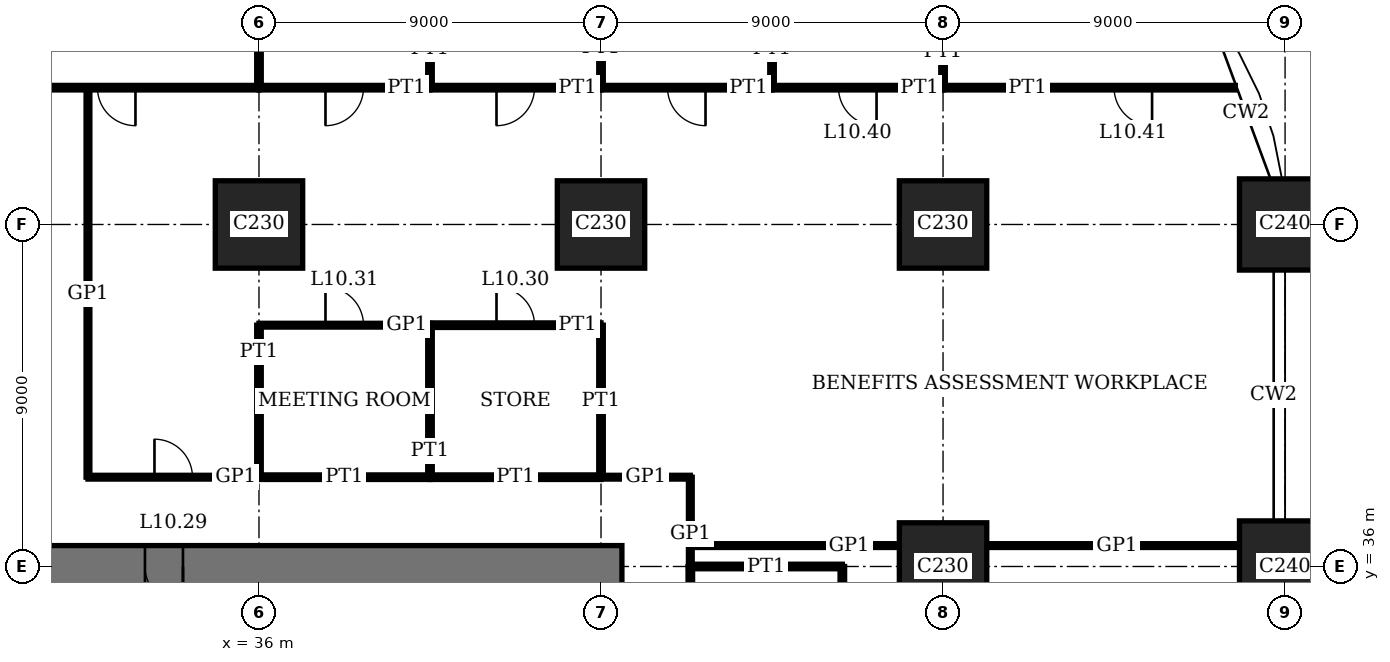
"""IFC4 building model, lengths in metres.
Left out: names, types, materials, properties, quantities, classifications, styles, units other than length and angle.
Written with IfcOpenShell. Run it as: python <this file> out.ifc"""

import sys

from ifc_helpers import new_model, si_unit, direction, frame, frame_2d, origin, origin_2d, place, context, subcontext, project, spatial, rectangle, extrude, element, fill, save


model = new_model("IFC4")
c1 = context("Model", 3, precision=1e-05, world=origin(), true_north=direction((0.0, 1.0)))
c2 = subcontext(c1, "Body", "Model", "MODEL_VIEW")
j1 = project(units=[si_unit("LENGTHUNIT", "METRE"), si_unit("PLANEANGLEUNIT", "RADIAN")], contexts=[c1])
p1 = place(None, origin())
s1 = spatial("IfcSite", under=j1, at=p1, CompositionType="ELEMENT")
p2 = place(p1, origin())
s2 = spatial("IfcBuilding", under=s1, at=p2, CompositionType="ELEMENT")
p3 = place(p2, frame((0.0, 0.0, 43.8)))
s3 = spatial("IfcBuildingStorey", under=s2, at=p3, CompositionType="ELEMENT", Elevation=43.8)
for number, where, z_axis, x_axis in (
    (1, (36.0, 45.0, 0.0), (0.0, 0.0, 1.0), (1.0, 0.0, 0.0)),
    (2, (45.0, 45.0, 0.0), (0.0, 0.0, 1.0), (1.0, 0.0, 0.0)),
    (3, (54.0, 36.0, 0.0), (0.0, 0.0, 1.0), (1.0, 0.0, 0.0)),
    (4, (54.0, 45.0, 0.0), (0.0, 0.0, 1.0), (1.0, 0.0, 0.0)),
):
    element("IfcColumn", number, at=place(p3, frame(where, z_axis=z_axis, x_axis=x_axis)), inside=s3, PredefinedType="COLUMN", context=c2, shape_type="SweptSolid", body=[
        extrude(rectangle(XDim=2.3, YDim=2.3, at=origin_2d()), origin(), (0.0, 0.0, 1.0), 4.0),
    ])
for number, where, z_axis, x_axis in (
    (5, (63.0, 36.0, 0.0), (0.0, 0.0, 1.0), (1.0, 0.0, 0.0)),
    (6, (63.0, 45.0, 0.0), (0.0, 0.0, 1.0), (1.0, 0.0, 0.0)),
):
    element("IfcColumn", number, at=place(p3, frame(where, z_axis=z_axis, x_axis=x_axis)), inside=s3, PredefinedType="COLUMN", context=c2, shape_type="SweptSolid", body=[
        extrude(rectangle(XDim=2.4, YDim=2.4, at=origin_2d()), origin(), (0.0, 0.0, 1.0), 4.0),
    ])
p4 = place(p3, frame((45.55, 36.0, 0.0), z_axis=(0.0, 0.0, 1.0), x_axis=(-1.0, 0.0, 0.0)))
e7 = element("IfcWall", 7, at=p4, inside=s3, PredefinedType="SHEAR", context=c2, shape_type="SweptSolid", body=[
    extrude(rectangle(XDim=28.1, YDim=1.1, at=frame_2d((14.05, 0.0))), origin(), (0.0, 0.0, 1.0), 4.0),
])
p5 = place(p4, frame((11.55, 0.0, 0.0)))
e8 = element("IfcOpeningElement", 8, at=p5, cuts=e7, PredefinedType="OPENING", context=c2, shape_type="SweptSolid", body=[
    extrude(rectangle(XDim=1.0, YDim=2.4, at=frame_2d((0.5, 1.2))), frame((0.0, 0.56, 0.0), z_axis=(0.0, -1.0, 0.0), x_axis=(1.0, 0.0, 0.0)), (0.0, 0.0, 1.0), 1.12),
])
p6 = place(p4, frame((16.55, 0.0, 0.0)))
e9 = element("IfcOpeningElement", 9, at=p6, cuts=e7, PredefinedType="OPENING", context=c2, shape_type="SweptSolid", body=[
    extrude(rectangle(XDim=1.0, YDim=2.4, at=frame_2d((0.5, 1.2))), frame((0.0, 0.56, 0.0), z_axis=(0.0, -1.0, 0.0), x_axis=(1.0, 0.0, 0.0)), (0.0, 0.0, 1.0), 1.12),
])
p7 = place(p4, frame((20.0, 0.0, 0.0)))
e10 = element("IfcOpeningElement", 10, at=p7, cuts=e7, PredefinedType="OPENING", context=c2, shape_type="SweptSolid", body=[
    extrude(rectangle(XDim=1.1, YDim=2.4, at=frame_2d((0.55, 1.2))), frame((0.0, 0.56, 0.0), z_axis=(0.0, -1.0, 0.0), x_axis=(1.0, 0.0, 0.0)), (0.0, 0.0, 1.0), 1.12),
])
p8 = place(p4, frame((24.05, 0.0, 0.0)))
e11 = element("IfcOpeningElement", 11, at=p8, cuts=e7, PredefinedType="OPENING", context=c2, shape_type="SweptSolid", body=[
    extrude(rectangle(XDim=1.0, YDim=2.4, at=frame_2d((0.5, 1.2))), frame((0.0, 0.56, 0.0), z_axis=(0.0, -1.0, 0.0), x_axis=(1.0, 0.0, 0.0)), (0.0, 0.0, 1.0), 1.12),
])
p9 = place(p3, frame((47.35, 36.0, 0.0), z_axis=(0.0, 0.0, 1.0), x_axis=(1.0, 0.0, 0.0)))
e12 = element("IfcWall", 12, at=p9, inside=s3, PredefinedType="PARTITIONING", context=c2, shape_type="SweptSolid", body=[
    extrude(rectangle(XDim=4.0, YDim=0.12, at=frame_2d((2.0, 0.0))), origin(), (0.0, 0.0, 1.0), 3.05),
])
p10 = place(p3, frame((47.35, 36.55, 0.0), z_axis=(0.0, 0.0, 1.0), x_axis=(1.0, 0.0, 0.0)))
e13 = element("IfcWall", 13, at=p10, inside=s3, PredefinedType="PARTITIONING", context=c2, shape_type="SweptSolid", body=[
    extrude(rectangle(XDim=5.5, YDim=0.1, at=frame_2d((2.75, 0.0))), origin(), (0.0, 0.0, 1.0), 3.75),
])
p11 = place(p3, frame((55.15, 36.55, 0.0), z_axis=(0.0, 0.0, 1.0), x_axis=(1.0, 0.0, 0.0)))
e14 = element("IfcWall", 14, at=p11, inside=s3, PredefinedType="PARTITIONING", context=c2, shape_type="SweptSolid", body=[
    extrude(rectangle(XDim=6.65, YDim=0.1, at=frame_2d((3.325, 0.0))), origin(), (0.0, 0.0, 1.0), 3.75),
])
for number, where, z_axis, x_axis in (
    (15, (36.0, 38.35, 0.0), (0.0, 0.0, 1.0), (1.0, 0.0, 0.0)),
    (16, (40.5, 38.35, 0.0), (0.0, 0.0, 1.0), (1.0, 0.0, 0.0)),
):
    element("IfcWall", number, at=place(p3, frame(where, z_axis=z_axis, x_axis=x_axis)), inside=s3, PredefinedType="PARTITIONING", context=c2, shape_type="SweptSolid", body=[
        extrude(rectangle(XDim=4.5, YDim=0.12, at=frame_2d((2.25, 0.0))), origin(), (0.0, 0.0, 1.0), 3.75),
    ])
p12 = place(p3, frame((31.5, 38.35, 0.0), z_axis=(0.0, 0.0, 1.0), x_axis=(1.0, 0.0, 0.0)))
e17 = element("IfcWall", 17, at=p12, inside=s3, PredefinedType="PARTITIONING", context=c2, shape_type="SweptSolid", body=[
    extrude(rectangle(XDim=4.5, YDim=0.1, at=frame_2d((2.25, 0.0))), origin(), (0.0, 0.0, 1.0), 3.75),
])
p13 = place(p12, frame((1.75, 0.0, 0.0)))
e18 = element("IfcOpeningElement", 18, at=p13, cuts=e17, PredefinedType="OPENING", context=c2, shape_type="SweptSolid", body=[
    extrude(rectangle(XDim=1.0, YDim=2.4, at=frame_2d((0.5, 1.2))), frame((0.0, 0.06, 0.0), z_axis=(0.0, -1.0, 0.0), x_axis=(1.0, 0.0, 0.0)), (0.0, 0.0, 1.0), 0.12),
])
p14 = place(p3, frame((45.0, 38.35, 0.0), z_axis=(0.0, 0.0, 1.0), x_axis=(1.0, 0.0, 0.0)))
e19 = element("IfcWall", 19, at=p14, inside=s3, PredefinedType="PARTITIONING", context=c2, shape_type="SweptSolid", body=[
    extrude(rectangle(XDim=2.35, YDim=0.1, at=frame_2d((1.175, 0.0))), origin(), (0.0, 0.0, 1.0), 3.75),
])
p15 = place(p3, frame((40.5, 42.35, 0.0), z_axis=(0.0, 0.0, 1.0), x_axis=(1.0, 0.0, 0.0)))
e20 = element("IfcWall", 20, at=p15, inside=s3, PredefinedType="PARTITIONING", context=c2, shape_type="SweptSolid", body=[
    extrude(rectangle(XDim=4.5, YDim=0.12, at=frame_2d((2.25, 0.0))), origin(), (0.0, 0.0, 1.0), 3.75),
])
p16 = place(p15, frame((1.75, 0.0, 0.0)))
e21 = element("IfcOpeningElement", 21, at=p16, cuts=e20, PredefinedType="OPENING", context=c2, shape_type="SweptSolid", body=[
    extrude(rectangle(XDim=1.0, YDim=2.4, at=frame_2d((0.5, 1.2))), frame((0.0, 0.07, 0.0), z_axis=(0.0, -1.0, 0.0), x_axis=(1.0, 0.0, 0.0)), (0.0, 0.0, 1.0), 0.14),
])
p17 = place(p3, frame((36.0, 42.35, 0.0), z_axis=(0.0, 0.0, 1.0), x_axis=(1.0, 0.0, 0.0)))
e22 = element("IfcWall", 22, at=p17, inside=s3, PredefinedType="PARTITIONING", context=c2, shape_type="SweptSolid", body=[
    extrude(rectangle(XDim=4.5, YDim=0.1, at=frame_2d((2.25, 0.0))), origin(), (0.0, 0.0, 1.0), 3.75),
])
p18 = place(p17, frame((1.75, 0.0, 0.0)))
e23 = element("IfcOpeningElement", 23, at=p18, cuts=e22, PredefinedType="OPENING", context=c2, shape_type="SweptSolid", body=[
    extrude(rectangle(XDim=1.0, YDim=2.4, at=frame_2d((0.5, 1.2))), frame((0.0, 0.06, 0.0), z_axis=(0.0, -1.0, 0.0), x_axis=(1.0, 0.0, 0.0)), (0.0, 0.0, 1.0), 0.12),
])
p19 = place(p3, frame((27.0, 48.6, 0.0), z_axis=(0.0, 0.0, 1.0), x_axis=(1.0, 0.0, 0.0)))
e24 = element("IfcWall", 24, at=p19, inside=s3, PredefinedType="PARTITIONING", context=c2, shape_type="SweptSolid", body=[
    extrude(rectangle(XDim=9.0, YDim=0.12, at=frame_2d((4.5, 0.0))), origin(), (0.0, 0.0, 1.0), 3.75),
])
p20 = place(p19, frame((4.75, 0.0, 0.0)))
e25 = element("IfcOpeningElement", 25, at=p20, cuts=e24, PredefinedType="OPENING", context=c2, shape_type="SweptSolid", body=[
    extrude(rectangle(XDim=1.0, YDim=2.4, at=frame_2d((0.5, 1.2))), frame((0.0, 0.07, 0.0), z_axis=(0.0, -1.0, 0.0), x_axis=(1.0, 0.0, 0.0)), (0.0, 0.0, 1.0), 0.14),
])
p21 = place(p3, frame((36.0, 48.6, 0.0), z_axis=(0.0, 0.0, 1.0), x_axis=(1.0, 0.0, 0.0)))
e26 = element("IfcWall", 26, at=p21, inside=s3, PredefinedType="PARTITIONING", context=c2, shape_type="SweptSolid", body=[
    extrude(rectangle(XDim=4.5, YDim=0.12, at=frame_2d((2.25, 0.0))), origin(), (0.0, 0.0, 1.0), 3.75),
])
p22 = place(p21, frame((1.75, 0.0, 0.0)))
e27 = element("IfcOpeningElement", 27, at=p22, cuts=e26, PredefinedType="OPENING", context=c2, shape_type="SweptSolid", body=[
    extrude(rectangle(XDim=1.0, YDim=2.4, at=frame_2d((0.5, 1.2))), frame((0.0, 0.07, 0.0), z_axis=(0.0, -1.0, 0.0), x_axis=(1.0, 0.0, 0.0)), (0.0, 0.0, 1.0), 0.14),
])
p23 = place(p3, frame((40.5, 48.6, 0.0), z_axis=(0.0, 0.0, 1.0), x_axis=(1.0, 0.0, 0.0)))
e28 = element("IfcWall", 28, at=p23, inside=s3, PredefinedType="PARTITIONING", context=c2, shape_type="SweptSolid", body=[
    extrude(rectangle(XDim=4.5, YDim=0.12, at=frame_2d((2.25, 0.0))), origin(), (0.0, 0.0, 1.0), 3.75),
])
p24 = place(p23, frame((1.75, 0.0, 0.0)))
e29 = element("IfcOpeningElement", 29, at=p24, cuts=e28, PredefinedType="OPENING", context=c2, shape_type="SweptSolid", body=[
    extrude(rectangle(XDim=1.0, YDim=2.4, at=frame_2d((0.5, 1.2))), frame((0.0, 0.07, 0.0), z_axis=(0.0, -1.0, 0.0), x_axis=(1.0, 0.0, 0.0)), (0.0, 0.0, 1.0), 0.14),
])
p25 = place(p3, frame((45.0, 48.6, 0.0), z_axis=(0.0, 0.0, 1.0), x_axis=(1.0, 0.0, 0.0)))
e30 = element("IfcWall", 30, at=p25, inside=s3, PredefinedType="PARTITIONING", context=c2, shape_type="SweptSolid", body=[
    extrude(rectangle(XDim=4.5, YDim=0.12, at=frame_2d((2.25, 0.0))), origin(), (0.0, 0.0, 1.0), 3.75),
])
p26 = place(p25, frame((1.75, 0.0, 0.0)))
e31 = element("IfcOpeningElement", 31, at=p26, cuts=e30, PredefinedType="OPENING", context=c2, shape_type="SweptSolid", body=[
    extrude(rectangle(XDim=1.0, YDim=2.4, at=frame_2d((0.5, 1.2))), frame((0.0, 0.07, 0.0), z_axis=(0.0, -1.0, 0.0), x_axis=(1.0, 0.0, 0.0)), (0.0, 0.0, 1.0), 0.14),
])
p27 = place(p3, frame((49.5, 48.6, 0.0), z_axis=(0.0, 0.0, 1.0), x_axis=(1.0, 0.0, 0.0)))
e32 = element("IfcWall", 32, at=p27, inside=s3, PredefinedType="PARTITIONING", context=c2, shape_type="SweptSolid", body=[
    extrude(rectangle(XDim=4.5, YDim=0.12, at=frame_2d((2.25, 0.0))), origin(), (0.0, 0.0, 1.0), 3.75),
])
p28 = place(p27, frame((1.75, 0.0, 0.0)))
e33 = element("IfcOpeningElement", 33, at=p28, cuts=e32, PredefinedType="OPENING", context=c2, shape_type="SweptSolid", body=[
    extrude(rectangle(XDim=1.0, YDim=2.4, at=frame_2d((0.5, 1.2))), frame((0.0, 0.07, 0.0), z_axis=(0.0, -1.0, 0.0), x_axis=(1.0, 0.0, 0.0)), (0.0, 0.0, 1.0), 0.14),
])
p29 = place(p3, frame((54.0, 48.6, 0.0), z_axis=(0.0, 0.0, 1.0), x_axis=(1.0, 0.0, 0.0)))
e34 = element("IfcWall", 34, at=p29, inside=s3, PredefinedType="PARTITIONING", context=c2, shape_type="SweptSolid", body=[
    extrude(rectangle(XDim=7.69, YDim=0.12, at=frame_2d((3.845, 0.0))), origin(), (0.0, 0.0, 1.0), 3.75),
])
p30 = place(p29, frame((4.5, 0.0, 0.0)))
e35 = element("IfcOpeningElement", 35, at=p30, cuts=e34, PredefinedType="OPENING", context=c2, shape_type="SweptSolid", body=[
    extrude(rectangle(XDim=1.0, YDim=2.4, at=frame_2d((0.5, 1.2))), frame((0.0, 0.07, 0.0), z_axis=(0.0, -1.0, 0.0), x_axis=(1.0, 0.0, 0.0)), (0.0, 0.0, 1.0), 0.14),
])
p31 = place(p3, frame((31.5, 38.35, 0.0), z_axis=(0.0, 0.0, 1.0), x_axis=(0.0, 1.0, 0.0)))
e36 = element("IfcWall", 36, at=p31, inside=s3, PredefinedType="PARTITIONING", context=c2, shape_type="SweptSolid", body=[
    extrude(rectangle(XDim=10.26, YDim=0.1, at=frame_2d((5.13, 0.0))), origin(), (0.0, 0.0, 1.0), 3.75),
])
p32 = place(p3, frame((36.0, 48.6, 0.0), z_axis=(0.0, 0.0, 1.0), x_axis=(0.0, 1.0, 0.0)))
e37 = element("IfcWall", 37, at=p32, inside=s3, PredefinedType="PARTITIONING", context=c2, shape_type="SweptSolid", body=[
    extrude(rectangle(XDim=4.2, YDim=0.12, at=frame_2d((2.1, 0.0))), origin(), (0.0, 0.0, 1.0), 3.05),
])
p33 = place(p3, frame((36.0, 38.35, 0.0), z_axis=(0.0, 0.0, 1.0), x_axis=(0.0, 1.0, 0.0)))
e38 = element("IfcWall", 38, at=p33, inside=s3, PredefinedType="PARTITIONING", context=c2, shape_type="SweptSolid", body=[
    extrude(rectangle(XDim=4.0, YDim=0.12, at=frame_2d((2.0, 0.0))), origin(), (0.0, 0.0, 1.0), 3.05),
])
p34 = place(p3, frame((40.5, 48.6, 0.0), z_axis=(0.0, 0.0, 1.0), x_axis=(0.0, 1.0, 0.0)))
e39 = element("IfcWall", 39, at=p34, inside=s3, PredefinedType="PARTITIONING", context=c2, shape_type="SweptSolid", body=[
    extrude(rectangle(XDim=5.09, YDim=0.12, at=frame_2d((2.545, 0.0))), origin(), (0.0, 0.0, 1.0), 3.75),
])
p35 = place(p3, frame((40.5, 38.35, 0.0), z_axis=(0.0, 0.0, 1.0), x_axis=(0.0, 1.0, 0.0)))
e40 = element("IfcWall", 40, at=p35, inside=s3, PredefinedType="PARTITIONING", context=c2, shape_type="SweptSolid", body=[
    extrude(rectangle(XDim=4.0, YDim=0.12, at=frame_2d((2.0, 0.0))), origin(), (0.0, 0.0, 1.0), 3.75),
])
p36 = place(p3, frame((45.0, 48.6, 0.0), z_axis=(0.0, 0.0, 1.0), x_axis=(0.0, 1.0, 0.0)))
e41 = element("IfcWall", 41, at=p36, inside=s3, PredefinedType="PARTITIONING", context=c2, shape_type="SweptSolid", body=[
    extrude(rectangle(XDim=4.2, YDim=0.12, at=frame_2d((2.1, 0.0))), origin(), (0.0, 0.0, 1.0), 3.05),
])
p37 = place(p3, frame((45.0, 38.35, 0.0), z_axis=(0.0, 0.0, 1.0), x_axis=(0.0, 1.0, 0.0)))
e42 = element("IfcWall", 42, at=p37, inside=s3, PredefinedType="PARTITIONING", context=c2, shape_type="SweptSolid", body=[
    extrude(rectangle(XDim=4.0, YDim=0.12, at=frame_2d((2.0, 0.0))), origin(), (0.0, 0.0, 1.0), 3.05),
])
p38 = place(p3, frame((47.35, 31.5, 0.0), z_axis=(0.0, 0.0, 1.0), x_axis=(0.0, 1.0, 0.0)))
e43 = element("IfcWall", 43, at=p38, inside=s3, PredefinedType="PARTITIONING", context=c2, shape_type="SweptSolid", body=[
    extrude(rectangle(XDim=4.5, YDim=0.12, at=frame_2d((2.25, 0.0))), origin(), (0.0, 0.0, 1.0), 3.75),
])
p39 = place(p3, frame((47.35, 36.0, 0.0), z_axis=(0.0, 0.0, 1.0), x_axis=(0.0, 1.0, 0.0)))
e44 = element("IfcWall", 44, at=p39, inside=s3, PredefinedType="PARTITIONING", context=c2, shape_type="SweptSolid", body=[
    extrude(rectangle(XDim=2.35, YDim=0.1, at=frame_2d((1.175, 0.0))), origin(), (0.0, 0.0, 1.0), 3.75),
])
p40 = place(p3, frame((49.5, 48.6, 0.0), z_axis=(0.0, 0.0, 1.0), x_axis=(0.0, 1.0, 0.0)))
e45 = element("IfcWall", 45, at=p40, inside=s3, PredefinedType="PARTITIONING", context=c2, shape_type="SweptSolid", body=[
    extrude(rectangle(XDim=5.09, YDim=0.12, at=frame_2d((2.545, 0.0))), origin(), (0.0, 0.0, 1.0), 3.75),
])
p41 = place(p3, frame((51.35, 31.5, 0.0), z_axis=(0.0, 0.0, 1.0), x_axis=(0.0, 1.0, 0.0)))
e46 = element("IfcWall", 46, at=p41, inside=s3, PredefinedType="PARTITIONING", context=c2, shape_type="SweptSolid", body=[
    extrude(rectangle(XDim=4.5, YDim=0.12, at=frame_2d((2.25, 0.0))), origin(), (0.0, 0.0, 1.0), 3.75),
])
p42 = place(p41, frame((1.75, 0.0, 0.0)))
e47 = element("IfcOpeningElement", 47, at=p42, cuts=e46, PredefinedType="OPENING", context=c2, shape_type="SweptSolid", body=[
    extrude(rectangle(XDim=1.0, YDim=2.4, at=frame_2d((0.5, 1.2))), frame((0.0, 0.07, 0.0), z_axis=(0.0, -1.0, 0.0), x_axis=(1.0, 0.0, 0.0)), (0.0, 0.0, 1.0), 0.14),
])
p43 = place(p3, frame((54.0, 48.6, 0.0), z_axis=(0.0, 0.0, 1.0), x_axis=(0.0, 1.0, 0.0)))
e48 = element("IfcWall", 48, at=p43, inside=s3, PredefinedType="PARTITIONING", context=c2, shape_type="SweptSolid", body=[
    extrude(rectangle(XDim=4.2, YDim=0.12, at=frame_2d((2.1, 0.0))), origin(), (0.0, 0.0, 1.0), 3.05),
])
p44 = place(p5, origin())
e49 = element("IfcDoor", 49, at=p44, inside=s3, OperationType="SINGLE_SWING_RIGHT", PredefinedType="DOOR", context=c2, shape_type="SweptSolid", body=[
    extrude(rectangle(XDim=1.0, YDim=2.4, at=frame_2d((0.5, 1.2))), frame((0.0, 0.025, 0.0), z_axis=(0.0, -1.0, 0.0), x_axis=(1.0, 0.0, 0.0)), (0.0, 0.0, 1.0), 0.05),
    extrude(rectangle(XDim=0.04, YDim=2.4, at=frame_2d((0.02, 1.2))), frame((0.0, 0.4, 0.0), z_axis=(0.0, -1.0, 0.0), x_axis=(1.0, 0.0, 0.0)), (0.0, 0.0, 1.0), 0.8),
    extrude(rectangle(XDim=0.04, YDim=2.4, at=frame_2d((0.98, 1.2))), frame((0.0, 0.4, 0.0), z_axis=(0.0, -1.0, 0.0), x_axis=(1.0, 0.0, 0.0)), (0.0, 0.0, 1.0), 0.8),
    extrude(rectangle(XDim=1.0, YDim=0.04, at=frame_2d((0.5, 2.38))), frame((0.0, 0.4, 0.0), z_axis=(0.0, -1.0, 0.0), x_axis=(1.0, 0.0, 0.0)), (0.0, 0.0, 1.0), 0.8),
])
fill(e8, e49)
p45 = place(p13, origin())
e50 = element("IfcDoor", 50, at=p45, inside=s3, OperationType="SINGLE_SWING_RIGHT", PredefinedType="DOOR", context=c2, shape_type="SweptSolid", body=[
    extrude(rectangle(XDim=1.0, YDim=2.4, at=frame_2d((0.5, 1.2))), frame((0.0, 0.02, 0.0), z_axis=(0.0, -1.0, 0.0), x_axis=(1.0, 0.0, 0.0)), (0.0, 0.0, 1.0), 0.04),
])
fill(e18, e50)
p46 = place(p16, origin())
e51 = element("IfcDoor", 51, at=p46, inside=s3, OperationType="SINGLE_SWING_RIGHT", PredefinedType="DOOR", context=c2, shape_type="SweptSolid", body=[
    extrude(rectangle(XDim=1.0, YDim=2.4, at=frame_2d((0.5, 1.2))), frame((0.0, 0.025, 0.0), z_axis=(0.0, -1.0, 0.0), x_axis=(1.0, 0.0, 0.0)), (0.0, 0.0, 1.0), 0.05),
])
fill(e21, e51)
p47 = place(p18, origin())
e52 = element("IfcDoor", 52, at=p47, inside=s3, OperationType="SINGLE_SWING_RIGHT", PredefinedType="DOOR", context=c2, shape_type="SweptSolid", body=[
    extrude(rectangle(XDim=1.0, YDim=2.4, at=frame_2d((0.5, 1.2))), frame((0.0, 0.02, 0.0), z_axis=(0.0, -1.0, 0.0), x_axis=(1.0, 0.0, 0.0)), (0.0, 0.0, 1.0), 0.04),
])
fill(e23, e52)
p48 = place(p20, origin())
e53 = element("IfcDoor", 53, at=p48, inside=s3, OperationType="SINGLE_SWING_RIGHT", PredefinedType="DOOR", context=c2, shape_type="SweptSolid", body=[
    extrude(rectangle(XDim=1.0, YDim=2.4, at=frame_2d((0.5, 1.2))), frame((0.0, 0.025, 0.0), z_axis=(0.0, -1.0, 0.0), x_axis=(1.0, 0.0, 0.0)), (0.0, 0.0, 1.0), 0.05),
])
fill(e25, e53)
p49 = place(p22, origin())
e54 = element("IfcDoor", 54, at=p49, inside=s3, OperationType="SINGLE_SWING_LEFT", PredefinedType="DOOR", context=c2, shape_type="SweptSolid", body=[
    extrude(rectangle(XDim=1.0, YDim=2.4, at=frame_2d((0.5, 1.2))), frame((0.0, 0.025, 0.0), z_axis=(0.0, -1.0, 0.0), x_axis=(1.0, 0.0, 0.0)), (0.0, 0.0, 1.0), 0.05),
])
fill(e27, e54)
p50 = place(p24, origin())
e55 = element("IfcDoor", 55, at=p50, inside=s3, OperationType="SINGLE_SWING_LEFT", PredefinedType="DOOR", context=c2, shape_type="SweptSolid", body=[
    extrude(rectangle(XDim=1.0, YDim=2.4, at=frame_2d((0.5, 1.2))), frame((0.0, 0.025, 0.0), z_axis=(0.0, -1.0, 0.0), x_axis=(1.0, 0.0, 0.0)), (0.0, 0.0, 1.0), 0.05),
])
fill(e29, e55)
p51 = place(p26, origin())
e56 = element("IfcDoor", 56, at=p51, inside=s3, OperationType="SINGLE_SWING_RIGHT", PredefinedType="DOOR", context=c2, shape_type="SweptSolid", body=[
    extrude(rectangle(XDim=1.0, YDim=2.4, at=frame_2d((0.5, 1.2))), frame((0.0, 0.025, 0.0), z_axis=(0.0, -1.0, 0.0), x_axis=(1.0, 0.0, 0.0)), (0.0, 0.0, 1.0), 0.05),
])
fill(e31, e56)
p52 = place(p28, origin())
e57 = element("IfcDoor", 57, at=p52, inside=s3, OperationType="SINGLE_SWING_RIGHT", PredefinedType="DOOR", context=c2, shape_type="SweptSolid", body=[
    extrude(rectangle(XDim=1.0, YDim=2.4, at=frame_2d((0.5, 1.2))), frame((0.0, 0.025, 0.0), z_axis=(0.0, -1.0, 0.0), x_axis=(1.0, 0.0, 0.0)), (0.0, 0.0, 1.0), 0.05),
])
fill(e33, e57)
p53 = place(p30, origin())
e58 = element("IfcDoor", 58, at=p53, inside=s3, OperationType="SINGLE_SWING_RIGHT", PredefinedType="DOOR", context=c2, shape_type="SweptSolid", body=[
    extrude(rectangle(XDim=1.0, YDim=2.4, at=frame_2d((0.5, 1.2))), frame((0.0, 0.025, 0.0), z_axis=(0.0, -1.0, 0.0), x_axis=(1.0, 0.0, 0.0)), (0.0, 0.0, 1.0), 0.05),
])
fill(e35, e58)
save(model, sys.argv[1])
